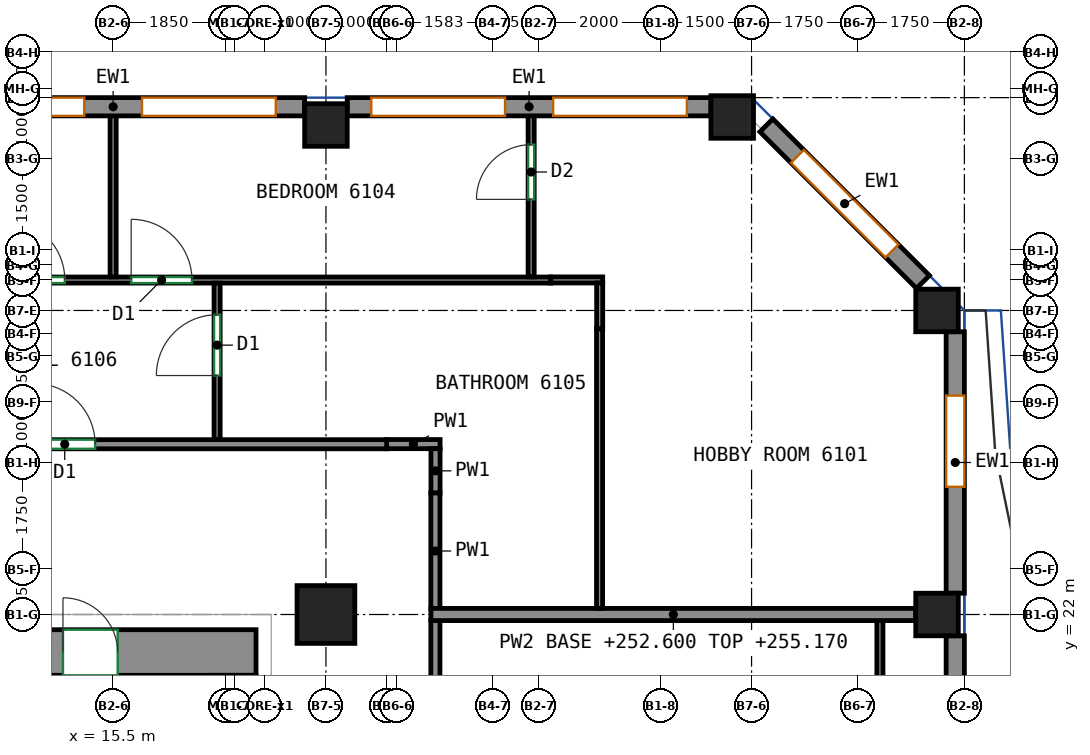
"""IFC4 building model, lengths in metres.
Left out: names, types, materials, properties, quantities, classifications, styles, units other than length and angle.
Written with IfcOpenShell. Run it as: python <this file> out.ifc"""

import sys

from ifc_helpers import new_model, si_unit, direction, frame, frame_2d, origin, origin_2d, place, context, subcontext, project, spatial, rectangle, extrude, source, transform, mapped, element, fill, save


model = new_model("IFC4")
c1 = context("Model", 3, precision=1e-05, world=origin(), true_north=direction((0.0, 1.0)))
c2 = subcontext(c1, "Body", "Model", "MODEL_VIEW")
j1 = project(units=[si_unit("LENGTHUNIT", "METRE"), si_unit("PLANEANGLEUNIT", "RADIAN")], contexts=[c1])
p1 = place(None, origin())
s1 = spatial("IfcSite", under=j1, at=p1, CompositionType="ELEMENT")
p2 = place(p1, origin())
s2 = spatial("IfcBuilding", under=s1, at=p2, CompositionType="ELEMENT")
p3 = place(p2, frame((0.0, 0.0, 252.6)))
s3 = spatial("IfcBuildingStorey", under=s2, at=p3, CompositionType="ELEMENT", Elevation=252.6)
m1 = source(origin(), c2, "Body", "SweptSolid", [
    extrude(rectangle(XDim=0.95, YDim=0.95, at=origin_2d()), origin(), (0.0, 0.0, 1.0), 3.12),
])
p4 = place(p3, frame((19.0, 22.0, 0.0), z_axis=(0.0, 0.0, 1.0), x_axis=(1.0, 0.0, 0.0)))
e1 = element("IfcColumn", 1, at=p4, inside=s3, PredefinedType="COLUMN", context=c2, shape_type="MappedRepresentation", body=[
    mapped(m1, transform((0.0, 0.0, 0.0))),
])
m2 = source(origin(), c2, "Body", "SweptSolid", [
    extrude(rectangle(XDim=0.7, YDim=0.7, at=origin_2d()), origin(), (0.0, 0.0, 1.0), 3.12),
])
for number, where, z_axis, x_axis in (
    (2, (19.0, 30.05, 0.0), (0.0, 0.0, 1.0), (1.0, 0.0, 0.0)),
    (3, (25.682, 30.182, 0.0), (0.0, 0.0, 1.0), (1.0, 0.0, 0.0)),
    (4, (29.05, 22.0, 0.0), (0.0, 0.0, 1.0), (1.0, 0.0, 0.0)),
    (5, (29.05, 27.0, 0.0), (0.0, 0.0, 1.0), (1.0, 0.0, 0.0)),
):
    element("IfcColumn", number, at=place(p3, frame(where, z_axis=z_axis, x_axis=x_axis)), inside=s3, PredefinedType="COLUMN", context=c2, shape_type="MappedRepresentation", body=[
        mapped(m2, transform((0.0, 0.0, 0.0))),
    ])
m3 = source(origin(), c2, "Body", "SweptSolid", [
    extrude(rectangle(XDim=33.6, YDim=0.75, at=frame_2d((16.8, 0.0))), origin(), (0.0, 0.0, 1.0), 3.12),
])
p5 = place(p3, frame((-15.75, 21.375, 0.0), z_axis=(0.0, 0.0, 1.0), x_axis=(1.0, 0.0, 0.0)))
e6 = element("IfcWall", 6, at=p5, inside=s3, PredefinedType="SHEAR", context=c2, shape_type="MappedRepresentation", body=[
    mapped(m3, transform((0.0, 0.0, 0.0))),
])
p6 = place(p5, frame((6.581, 0.0, 0.0)))
e7 = element("IfcOpeningElement", 7, at=p6, cuts=e6, PredefinedType="OPENING", context=c2, shape_type="SweptSolid", body=[
    extrude(rectangle(XDim=0.9, YDim=2.1, at=frame_2d((0.45, 1.05))), frame((0.0, 0.385, 0.0), z_axis=(0.0, -1.0, 0.0), x_axis=(1.0, 0.0, 0.0)), (0.0, 0.0, 1.0), 0.77),
])
p7 = place(p5, frame((11.888, 0.0, 0.0)))
e8 = element("IfcOpeningElement", 8, at=p7, cuts=e6, PredefinedType="OPENING", context=c2, shape_type="SweptSolid", body=[
    extrude(rectangle(XDim=0.9, YDim=2.1, at=frame_2d((0.45, 1.05))), frame((0.0, 0.385, 0.0), z_axis=(0.0, -1.0, 0.0), x_axis=(1.0, 0.0, 0.0)), (0.0, 0.0, 1.0), 0.77),
])
p8 = place(p5, frame((17.315, 0.0, 0.0)))
e9 = element("IfcOpeningElement", 9, at=p8, cuts=e6, PredefinedType="OPENING", context=c2, shape_type="SweptSolid", body=[
    extrude(rectangle(XDim=0.9, YDim=2.1, at=frame_2d((0.45, 1.05))), frame((0.0, 0.385, 0.0), z_axis=(0.0, -1.0, 0.0), x_axis=(1.0, 0.0, 0.0)), (0.0, 0.0, 1.0), 0.77),
])
p9 = place(p5, frame((21.536, 0.0, 0.0)))
e10 = element("IfcOpeningElement", 10, at=p9, cuts=e6, PredefinedType="OPENING", context=c2, shape_type="SweptSolid", body=[
    extrude(rectangle(XDim=0.9, YDim=2.1, at=frame_2d((0.45, 1.05))), frame((0.0, 0.385, 0.0), z_axis=(0.0, -1.0, 0.0), x_axis=(1.0, 0.0, 0.0)), (0.0, 0.0, 1.0), 0.77),
])
p10 = place(p5, frame((24.537, 0.0, 0.0)))
e11 = element("IfcOpeningElement", 11, at=p10, cuts=e6, PredefinedType="OPENING", context=c2, shape_type="SweptSolid", body=[
    extrude(rectangle(XDim=0.9, YDim=2.1, at=frame_2d((0.45, 1.05))), frame((0.0, 0.385, 0.0), z_axis=(0.0, -1.0, 0.0), x_axis=(1.0, 0.0, 0.0)), (0.0, 0.0, 1.0), 0.77),
])
p11 = place(p5, frame((27.07, 0.0, 0.0)))
e12 = element("IfcOpeningElement", 12, at=p11, cuts=e6, PredefinedType="OPENING", context=c2, shape_type="SweptSolid", body=[
    extrude(rectangle(XDim=0.9, YDim=2.1, at=frame_2d((0.45, 1.05))), frame((0.0, 0.385, 0.0), z_axis=(0.0, -1.0, 0.0), x_axis=(1.0, 0.0, 0.0)), (0.0, 0.0, 1.0), 0.77),
])
p12 = place(p5, frame((2.275, 0.0, 0.0)))
e13 = element("IfcOpeningElement", 13, at=p12, cuts=e6, PredefinedType="OPENING", context=c2, shape_type="SweptSolid", body=[
    extrude(rectangle(XDim=0.9, YDim=2.1, at=frame_2d((0.45, 1.05))), frame((0.0, 0.385, 0.0), z_axis=(0.0, -1.0, 0.0), x_axis=(1.0, 0.0, 0.0)), (0.0, 0.0, 1.0), 0.77),
])
p13 = place(p5, frame((30.425, 0.0, 0.0)))
e14 = element("IfcOpeningElement", 14, at=p13, cuts=e6, PredefinedType="OPENING", context=c2, shape_type="SweptSolid", body=[
    extrude(rectangle(XDim=0.9, YDim=2.1, at=frame_2d((0.45, 1.05))), frame((0.0, 0.385, 0.0), z_axis=(0.0, -1.0, 0.0), x_axis=(1.0, 0.0, 0.0)), (0.0, 0.0, 1.0), 0.77),
])
m4 = source(origin(), c2, "Body", "SweptSolid", [
    extrude(rectangle(XDim=13.3, YDim=0.3, at=frame_2d((6.65, 0.0))), origin(), (0.0, 0.0, 1.0), 3.12),
])
p14 = place(p3, frame((29.35, 8.35, 0.0), z_axis=(0.0, 0.0, 1.0), x_axis=(0.0, 1.0, 0.0)))
e15 = element("IfcWall", 15, at=p14, inside=s3, PredefinedType="SOLIDWALL", context=c2, shape_type="MappedRepresentation", body=[
    mapped(m4, transform((0.0, 0.0, 0.0))),
])
p15 = place(p14, frame((0.913, 0.0, 0.8)))
e16 = element("IfcOpeningElement", 16, at=p15, cuts=e15, PredefinedType="OPENING", context=c2, shape_type="SweptSolid", body=[
    extrude(rectangle(XDim=1.5, YDim=2.05, at=frame_2d((0.75, 1.025))), frame((0.0, 0.16, 0.0), z_axis=(0.0, -1.0, 0.0), x_axis=(1.0, 0.0, 0.0)), (0.0, 0.0, 1.0), 0.32),
])
p16 = place(p14, frame((4.238, 0.0, 0.8)))
e17 = element("IfcOpeningElement", 17, at=p16, cuts=e15, PredefinedType="OPENING", context=c2, shape_type="SweptSolid", body=[
    extrude(rectangle(XDim=1.5, YDim=2.05, at=frame_2d((0.75, 1.025))), frame((0.0, 0.16, 0.0), z_axis=(0.0, -1.0, 0.0), x_axis=(1.0, 0.0, 0.0)), (0.0, 0.0, 1.0), 0.32),
])
p17 = place(p14, frame((7.562, 0.0, 0.8)))
e18 = element("IfcOpeningElement", 18, at=p17, cuts=e15, PredefinedType="OPENING", context=c2, shape_type="SweptSolid", body=[
    extrude(rectangle(XDim=1.5, YDim=2.05, at=frame_2d((0.75, 1.025))), frame((0.0, 0.16, 0.0), z_axis=(0.0, -1.0, 0.0), x_axis=(1.0, 0.0, 0.0)), (0.0, 0.0, 1.0), 0.32),
])
p18 = place(p14, frame((10.887, 0.0, 0.8)))
e19 = element("IfcOpeningElement", 19, at=p18, cuts=e15, PredefinedType="OPENING", context=c2, shape_type="SweptSolid", body=[
    extrude(rectangle(XDim=1.5, YDim=2.05, at=frame_2d((0.75, 1.025))), frame((0.0, 0.16, 0.0), z_axis=(0.0, -1.0, 0.0), x_axis=(1.0, 0.0, 0.0)), (0.0, 0.0, 1.0), 0.32),
])
m5 = source(origin(), c2, "Body", "SweptSolid", [
    extrude(rectangle(XDim=4.3, YDim=0.3, at=frame_2d((2.15, 0.0))), origin(), (0.0, 0.0, 1.0), 3.12),
])
p19 = place(p3, frame((29.35, 22.35, 0.0), z_axis=(0.0, 0.0, 1.0), x_axis=(0.0, 1.0, 0.0)))
e20 = element("IfcWall", 20, at=p19, inside=s3, PredefinedType="SOLIDWALL", context=c2, shape_type="MappedRepresentation", body=[
    mapped(m5, transform((0.0, 0.0, 0.0))),
])
p20 = place(p19, frame((1.75, 0.0, 0.8)))
e21 = element("IfcOpeningElement", 21, at=p20, cuts=e20, PredefinedType="OPENING", context=c2, shape_type="SweptSolid", body=[
    extrude(rectangle(XDim=1.5, YDim=2.05, at=frame_2d((0.75, 1.025))), frame((0.0, 0.16, 0.0), z_axis=(0.0, -1.0, 0.0), x_axis=(1.0, 0.0, 0.0)), (0.0, 0.0, 1.0), 0.32),
])
m6 = source(origin(), c2, "Body", "SweptSolid", [
    extrude(rectangle(XDim=3.642, YDim=0.3, at=frame_2d((1.821, 0.0))), origin(), (0.0, 0.0, 1.0), 3.12),
])
p21 = place(p3, frame((28.819, 27.469, 0.0), z_axis=(0.0, 0.0, 1.0), x_axis=(-0.707106781187, 0.707106781187, 0.0)))
e22 = element("IfcWall", 22, at=p21, inside=s3, PredefinedType="SOLIDWALL", context=c2, shape_type="MappedRepresentation", body=[
    mapped(m6, transform((0.0, 0.0, 0.0))),
])
p22 = place(p21, frame((0.721, 0.0, 0.8)))
e23 = element("IfcOpeningElement", 23, at=p22, cuts=e22, PredefinedType="OPENING", context=c2, shape_type="SweptSolid", body=[
    extrude(rectangle(XDim=2.2, YDim=2.05, at=frame_2d((1.1, 1.025))), frame((0.0, 0.16, 0.0), z_axis=(0.0, -1.0, 0.0), x_axis=(1.0, 0.0, 0.0)), (0.0, 0.0, 1.0), 0.32),
])
m7 = source(origin(), c2, "Body", "SweptSolid", [
    extrude(rectangle(XDim=5.982, YDim=0.3, at=frame_2d((2.991, 0.0))), origin(), (0.0, 0.0, 1.0), 3.12),
])
p23 = place(p3, frame((25.332, 30.35, 0.0), z_axis=(0.0, 0.0, 1.0), x_axis=(-1.0, 0.0, 0.0)))
e24 = element("IfcWall", 24, at=p23, inside=s3, PredefinedType="SOLIDWALL", context=c2, shape_type="MappedRepresentation", body=[
    mapped(m7, transform((0.0, 0.0, 0.0))),
])
p24 = place(p23, frame((0.396, 0.0, 0.8)))
e25 = element("IfcOpeningElement", 25, at=p24, cuts=e24, PredefinedType="OPENING", context=c2, shape_type="SweptSolid", body=[
    extrude(rectangle(XDim=2.2, YDim=2.05, at=frame_2d((1.1, 1.025))), frame((0.0, 0.16, 0.0), z_axis=(0.0, -1.0, 0.0), x_axis=(1.0, 0.0, 0.0)), (0.0, 0.0, 1.0), 0.32),
])
p25 = place(p23, frame((3.386, 0.0, 0.8)))
e26 = element("IfcOpeningElement", 26, at=p25, cuts=e24, PredefinedType="OPENING", context=c2, shape_type="SweptSolid", body=[
    extrude(rectangle(XDim=2.2, YDim=2.05, at=frame_2d((1.1, 1.025))), frame((0.0, 0.16, 0.0), z_axis=(0.0, -1.0, 0.0), x_axis=(1.0, 0.0, 0.0)), (0.0, 0.0, 1.0), 0.32),
])
m8 = source(origin(), c2, "Body", "SweptSolid", [
    extrude(rectangle(XDim=6.3, YDim=0.3, at=frame_2d((3.15, 0.0))), origin(), (0.0, 0.0, 1.0), 3.12),
])
p26 = place(p3, frame((18.65, 30.35, 0.0), z_axis=(0.0, 0.0, 1.0), x_axis=(-1.0, 0.0, 0.0)))
e27 = element("IfcWall", 27, at=p26, inside=s3, PredefinedType="SOLIDWALL", context=c2, shape_type="MappedRepresentation", body=[
    mapped(m8, transform((0.0, 0.0, 0.0))),
])
p27 = place(p26, frame((0.475, 0.0, 0.8)))
e28 = element("IfcOpeningElement", 28, at=p27, cuts=e27, PredefinedType="OPENING", context=c2, shape_type="SweptSolid", body=[
    extrude(rectangle(XDim=2.2, YDim=2.05, at=frame_2d((1.1, 1.025))), frame((0.0, 0.16, 0.0), z_axis=(0.0, -1.0, 0.0), x_axis=(1.0, 0.0, 0.0)), (0.0, 0.0, 1.0), 0.32),
])
p28 = place(p26, frame((3.625, 0.0, 0.8)))
e29 = element("IfcOpeningElement", 29, at=p28, cuts=e27, PredefinedType="OPENING", context=c2, shape_type="SweptSolid", body=[
    extrude(rectangle(XDim=2.2, YDim=2.05, at=frame_2d((1.1, 1.025))), frame((0.0, 0.16, 0.0), z_axis=(0.0, -1.0, 0.0), x_axis=(1.0, 0.0, 0.0)), (0.0, 0.0, 1.0), 0.32),
])
p29 = place(p3, frame((20.8, 17.75, 0.0), z_axis=(0.0, 0.0, 1.0), x_axis=(0.0, 1.0, 0.0)))
e30 = element("IfcWall", 30, at=p29, inside=s3, PredefinedType="PARTITIONING", context=c2, shape_type="SweptSolid", body=[
    extrude(rectangle(XDim=4.16, YDim=0.15, at=frame_2d((2.08, 0.0))), origin(), (0.0, 0.0, 1.0), 3.12),
])
p30 = place(p3, frame((20.877, 24.802, 0.0), z_axis=(0.0, 0.0, 1.0), x_axis=(-1.0, 0.0, 0.0)))
e31 = element("IfcWall", 31, at=p30, inside=s3, PredefinedType="PARTITIONING", context=c2, shape_type="SweptSolid", body=[
    extrude(rectangle(XDim=0.879, YDim=0.15, at=frame_2d((0.439, 0.0))), origin(), (0.0, 0.0, 1.0), 3.12),
])
p31 = place(p3, frame((20.802, 23.998, 0.0), z_axis=(0.0, 0.0, 1.0), x_axis=(0.0, 1.0, 0.0)))
e32 = element("IfcWall", 32, at=p31, inside=s3, PredefinedType="PARTITIONING", context=c2, shape_type="SweptSolid", body=[
    extrude(rectangle(XDim=0.729, YDim=0.15, at=frame_2d((0.365, 0.0))), origin(), (0.0, 0.0, 1.0), 3.12),
])
p32 = place(p3, frame((20.8, 22.09, 0.0), z_axis=(0.0, 0.0, 1.0), x_axis=(0.0, 1.0, 0.0)))
e33 = element("IfcWall", 33, at=p32, inside=s3, PredefinedType="PARTITIONING", context=c2, shape_type="SweptSolid", body=[
    extrude(rectangle(XDim=1.908, YDim=0.15, at=frame_2d((0.954, 0.0))), origin(), (0.0, 0.0, 1.0), 3.12),
])
p33 = place(p3, frame((-16.075, 24.8, 0.0), z_axis=(0.0, 0.0, 1.0), x_axis=(1.0, 0.0, 0.0)))
e34 = element("IfcWall", 34, at=p33, inside=s3, PredefinedType="PARTITIONING", context=c2, shape_type="SweptSolid", body=[
    extrude(rectangle(XDim=36.073, YDim=0.15, at=frame_2d((18.037, 0.0))), origin(), (0.0, 0.0, 1.0), 3.12),
])
p34 = place(p33, frame((16.771, 0.0, 0.0)))
e35 = element("IfcOpeningElement", 35, at=p34, cuts=e34, PredefinedType="OPENING", context=c2, shape_type="SweptSolid", body=[
    extrude(rectangle(XDim=0.9, YDim=2.1, at=frame_2d((0.45, 1.05))), frame((0.0, 0.085, 0.0), z_axis=(0.0, -1.0, 0.0), x_axis=(1.0, 0.0, 0.0)), (0.0, 0.0, 1.0), 0.17),
])
p35 = place(p33, frame((30.279, 0.0, 0.0)))
e36 = element("IfcOpeningElement", 36, at=p35, cuts=e34, PredefinedType="OPENING", context=c2, shape_type="SweptSolid", body=[
    extrude(rectangle(XDim=1.0, YDim=2.1, at=frame_2d((0.5, 1.05))), frame((0.0, 0.085, 0.0), z_axis=(0.0, -1.0, 0.0), x_axis=(1.0, 0.0, 0.0)), (0.0, 0.0, 1.0), 0.17),
])
p36 = place(p3, frame((28.111, 12.841, 0.0), z_axis=(0.0, 0.0, 1.0), x_axis=(0.0, 1.0, 0.0)))
e37 = element("IfcWall", 37, at=p36, inside=s3, PredefinedType="PARTITIONING", context=c2, shape_type="SweptSolid", body=[
    extrude(rectangle(XDim=9.059, YDim=0.1, at=frame_2d((4.529, 0.0))), origin(), (0.0, 0.0, 1.0), 3.12),
])
p37 = place(p3, frame((20.727, 22.0, 0.0), z_axis=(0.0, 0.0, 1.0), x_axis=(1.0, 0.0, 0.0)))
e38 = element("IfcWall", 38, at=p37, inside=s3, PredefinedType="PARTITIONING", context=c2, shape_type="SweptSolid", body=[
    extrude(rectangle(XDim=7.973, YDim=0.2, at=frame_2d((3.986, 0.0))), origin(), (0.0, 0.0, 1.0), 2.57),
])
p38 = place(p3, frame((4.9, 27.5, 0.0), z_axis=(0.0, 0.0, 1.0), x_axis=(1.0, 0.0, 0.0)))
e39 = element("IfcWall", 39, at=p38, inside=s3, PredefinedType="PARTITIONING", context=c2, shape_type="SweptSolid", body=[
    extrude(rectangle(XDim=17.798, YDim=0.1, at=frame_2d((8.899, 0.0))), origin(), (0.0, 0.0, 1.0), 3.12),
])
p39 = place(p38, frame((8.806, 0.0, 0.0)))
e40 = element("IfcOpeningElement", 40, at=p39, cuts=e39, PredefinedType="OPENING", context=c2, shape_type="SweptSolid", body=[
    extrude(rectangle(XDim=1.0, YDim=2.1, at=frame_2d((0.5, 1.05))), frame((0.0, 0.06, 0.0), z_axis=(0.0, -1.0, 0.0), x_axis=(1.0, 0.0, 0.0)), (0.0, 0.0, 1.0), 0.12),
])
p40 = place(p38, frame((10.897, 0.0, 0.0)))
e41 = element("IfcOpeningElement", 41, at=p40, cuts=e39, PredefinedType="OPENING", context=c2, shape_type="SweptSolid", body=[
    extrude(rectangle(XDim=1.0, YDim=2.1, at=frame_2d((0.5, 1.05))), frame((0.0, 0.06, 0.0), z_axis=(0.0, -1.0, 0.0), x_axis=(1.0, 0.0, 0.0)), (0.0, 0.0, 1.0), 0.12),
])
p41 = place(p3, frame((17.21, 24.877, 0.0), z_axis=(0.0, 0.0, 1.0), x_axis=(0.0, 1.0, 0.0)))
e42 = element("IfcWall", 42, at=p41, inside=s3, PredefinedType="PARTITIONING", context=c2, shape_type="SweptSolid", body=[
    extrude(rectangle(XDim=2.573, YDim=0.1, at=frame_2d((1.287, 0.0))), origin(), (0.0, 0.0, 1.0), 3.12),
])
p42 = place(p41, frame((1.053, 0.0, 0.0)))
e43 = element("IfcOpeningElement", 43, at=p42, cuts=e42, PredefinedType="OPENING", context=c2, shape_type="SweptSolid", body=[
    extrude(rectangle(XDim=1.0, YDim=2.1, at=frame_2d((0.5, 1.05))), frame((0.0, 0.06, 0.0), z_axis=(0.0, -1.0, 0.0), x_axis=(1.0, 0.0, 0.0)), (0.0, 0.0, 1.0), 0.12),
])
p43 = place(p3, frame((23.552, 27.502, 0.0), z_axis=(0.0, 0.0, 1.0), x_axis=(-1.0, 0.0, 0.0)))
e44 = element("IfcWall", 44, at=p43, inside=s3, PredefinedType="PARTITIONING", context=c2, shape_type="SweptSolid", body=[
    extrude(rectangle(XDim=0.854, YDim=0.1, at=frame_2d((0.427, 0.0))), origin(), (0.0, 0.0, 1.0), 3.12),
])
p44 = place(p3, frame((23.502, 26.698, 0.0), z_axis=(0.0, 0.0, 1.0), x_axis=(0.0, 1.0, 0.0)))
e45 = element("IfcWall", 45, at=p44, inside=s3, PredefinedType="PARTITIONING", context=c2, shape_type="SweptSolid", body=[
    extrude(rectangle(XDim=0.754, YDim=0.1, at=frame_2d((0.377, 0.0))), origin(), (0.0, 0.0, 1.0), 3.12),
])
p45 = place(p3, frame((23.5, 22.1, 0.0), z_axis=(0.0, 0.0, 1.0), x_axis=(0.0, 1.0, 0.0)))
e46 = element("IfcWall", 46, at=p45, inside=s3, PredefinedType="PARTITIONING", context=c2, shape_type="SweptSolid", body=[
    extrude(rectangle(XDim=4.598, YDim=0.1, at=frame_2d((2.299, 0.0))), origin(), (0.0, 0.0, 1.0), 3.12),
])
p46 = place(p3, frame((15.5, 27.552, 0.0), z_axis=(0.0, 0.0, 1.0), x_axis=(0.0, 1.0, 0.0)))
e47 = element("IfcWall", 47, at=p46, inside=s3, PredefinedType="PARTITIONING", context=c2, shape_type="SweptSolid", body=[
    extrude(rectangle(XDim=2.698, YDim=0.1, at=frame_2d((1.349, 0.0))), origin(), (0.0, 0.0, 1.0), 3.12),
])
p47 = place(p3, frame((22.375, 27.552, 0.0), z_axis=(0.0, 0.0, 1.0), x_axis=(0.0, 1.0, 0.0)))
e48 = element("IfcWall", 48, at=p47, inside=s3, PredefinedType="PARTITIONING", context=c2, shape_type="SweptSolid", body=[
    extrude(rectangle(XDim=2.698, YDim=0.1, at=frame_2d((1.349, 0.0))), origin(), (0.0, 0.0, 1.0), 3.12),
])
p48 = place(p47, frame((1.275, 0.0, 0.0)))
e49 = element("IfcOpeningElement", 49, at=p48, cuts=e48, PredefinedType="OPENING", context=c2, shape_type="SweptSolid", body=[
    extrude(rectangle(XDim=0.9, YDim=2.1, at=frame_2d((0.45, 1.05))), frame((0.0, 0.06, 0.0), z_axis=(0.0, -1.0, 0.0), x_axis=(1.0, 0.0, 0.0)), (0.0, 0.0, 1.0), 0.12),
])
p49 = place(p20, origin())
e50 = element("IfcWindow", 50, at=p49, inside=s3, PartitioningType="SINGLE_PANEL", PredefinedType="WINDOW", context=c2, shape_type="SweptSolid", body=[
    extrude(rectangle(XDim=1.5, YDim=2.05, at=frame_2d((0.75, 1.025))), frame((0.0, 0.03, 0.0), z_axis=(0.0, -1.0, 0.0), x_axis=(1.0, 0.0, 0.0)), (0.0, 0.0, 1.0), 0.06),
])
fill(e21, e50)
p50 = place(p22, origin())
e51 = element("IfcWindow", 51, at=p50, inside=s3, PartitioningType="SINGLE_PANEL", PredefinedType="WINDOW", context=c2, shape_type="SweptSolid", body=[
    extrude(rectangle(XDim=2.2, YDim=2.05, at=frame_2d((1.1, 1.025))), frame((0.0, 0.03, 0.0), z_axis=(0.0, -1.0, 0.0), x_axis=(1.0, 0.0, 0.0)), (0.0, 0.0, 1.0), 0.06),
])
fill(e23, e51)
p51 = place(p24, origin())
e52 = element("IfcWindow", 52, at=p51, inside=s3, PartitioningType="SINGLE_PANEL", PredefinedType="WINDOW", context=c2, shape_type="SweptSolid", body=[
    extrude(rectangle(XDim=2.2, YDim=2.05, at=frame_2d((1.1, 1.025))), frame((0.0, 0.03, 0.0), z_axis=(0.0, -1.0, 0.0), x_axis=(1.0, 0.0, 0.0)), (0.0, 0.0, 1.0), 0.06),
])
fill(e25, e52)
p52 = place(p25, origin())
e53 = element("IfcWindow", 53, at=p52, inside=s3, PartitioningType="SINGLE_PANEL", PredefinedType="WINDOW", context=c2, shape_type="SweptSolid", body=[
    extrude(rectangle(XDim=2.2, YDim=2.05, at=frame_2d((1.1, 1.025))), frame((0.0, 0.03, 0.0), z_axis=(0.0, -1.0, 0.0), x_axis=(1.0, 0.0, 0.0)), (0.0, 0.0, 1.0), 0.06),
])
fill(e26, e53)
p53 = place(p27, origin())
e54 = element("IfcWindow", 54, at=p53, inside=s3, PartitioningType="SINGLE_PANEL", PredefinedType="WINDOW", context=c2, shape_type="SweptSolid", body=[
    extrude(rectangle(XDim=2.2, YDim=2.05, at=frame_2d((1.1, 1.025))), frame((0.0, 0.03, 0.0), z_axis=(0.0, -1.0, 0.0), x_axis=(1.0, 0.0, 0.0)), (0.0, 0.0, 1.0), 0.06),
])
fill(e28, e54)
p54 = place(p28, origin())
e55 = element("IfcWindow", 55, at=p54, inside=s3, PartitioningType="SINGLE_PANEL", PredefinedType="WINDOW", context=c2, shape_type="SweptSolid", body=[
    extrude(rectangle(XDim=2.2, YDim=2.05, at=frame_2d((1.1, 1.025))), frame((0.0, 0.03, 0.0), z_axis=(0.0, -1.0, 0.0), x_axis=(1.0, 0.0, 0.0)), (0.0, 0.0, 1.0), 0.06),
])
fill(e29, e55)
p55 = place(p13, origin())
e56 = element("IfcDoor", 56, at=p55, inside=s3, OperationType="SINGLE_SWING_LEFT", PredefinedType="DOOR", context=c2, shape_type="SweptSolid", body=[
    extrude(rectangle(XDim=0.9, YDim=2.1, at=frame_2d((0.45, 1.05))), frame((0.0, -0.23, 0.0), z_axis=(0.0, -1.0, 0.0), x_axis=(1.0, 0.0, 0.0)), (0.0, 0.0, 1.0), 0.05),
])
fill(e14, e56)
p56 = place(p35, origin())
e57 = element("IfcDoor", 57, at=p56, inside=s3, OperationType="SINGLE_SWING_LEFT", PredefinedType="DOOR", context=c2, shape_type="SweptSolid", body=[
    extrude(rectangle(XDim=1.0, YDim=2.1, at=frame_2d((0.5, 1.05))), frame((0.0, 0.025, 0.0), z_axis=(0.0, -1.0, 0.0), x_axis=(1.0, 0.0, 0.0)), (0.0, 0.0, 1.0), 0.05),
])
fill(e36, e57)
p57 = place(p42, origin())
e58 = element("IfcDoor", 58, at=p57, inside=s3, OperationType="SINGLE_SWING_LEFT", PredefinedType="DOOR", context=c2, shape_type="SweptSolid", body=[
    extrude(rectangle(XDim=1.0, YDim=2.1, at=frame_2d((0.5, 1.05))), frame((0.0, 0.025, 0.0), z_axis=(0.0, -1.0, 0.0), x_axis=(1.0, 0.0, 0.0)), (0.0, 0.0, 1.0), 0.05),
])
fill(e43, e58)
p58 = place(p39, origin())
e59 = element("IfcDoor", 59, at=p58, inside=s3, OperationType="SINGLE_SWING_LEFT", PredefinedType="DOOR", context=c2, shape_type="SweptSolid", body=[
    extrude(rectangle(XDim=1.0, YDim=2.1, at=frame_2d((0.5, 1.05))), frame((0.0, 0.025, 0.0), z_axis=(0.0, -1.0, 0.0), x_axis=(1.0, 0.0, 0.0)), (0.0, 0.0, 1.0), 0.05),
])
fill(e40, e59)
p59 = place(p40, origin())
e60 = element("IfcDoor", 60, at=p59, inside=s3, OperationType="SINGLE_SWING_LEFT", PredefinedType="DOOR", context=c2, shape_type="SweptSolid", body=[
    extrude(rectangle(XDim=1.0, YDim=2.1, at=frame_2d((0.5, 1.05))), frame((0.0, 0.025, 0.0), z_axis=(0.0, -1.0, 0.0), x_axis=(1.0, 0.0, 0.0)), (0.0, 0.0, 1.0), 0.05),
])
fill(e41, e60)
p60 = place(p48, origin())
e61 = element("IfcDoor", 61, at=p60, inside=s3, OperationType="SINGLE_SWING_LEFT", PredefinedType="DOOR", context=c2, shape_type="SweptSolid", body=[
    extrude(rectangle(XDim=0.9, YDim=2.1, at=frame_2d((0.45, 1.05))), frame((0.0, 0.025, 0.0), z_axis=(0.0, -1.0, 0.0), x_axis=(1.0, 0.0, 0.0)), (0.0, 0.0, 1.0), 0.05),
])
fill(e49, e61)
save(model, sys.argv[1])
